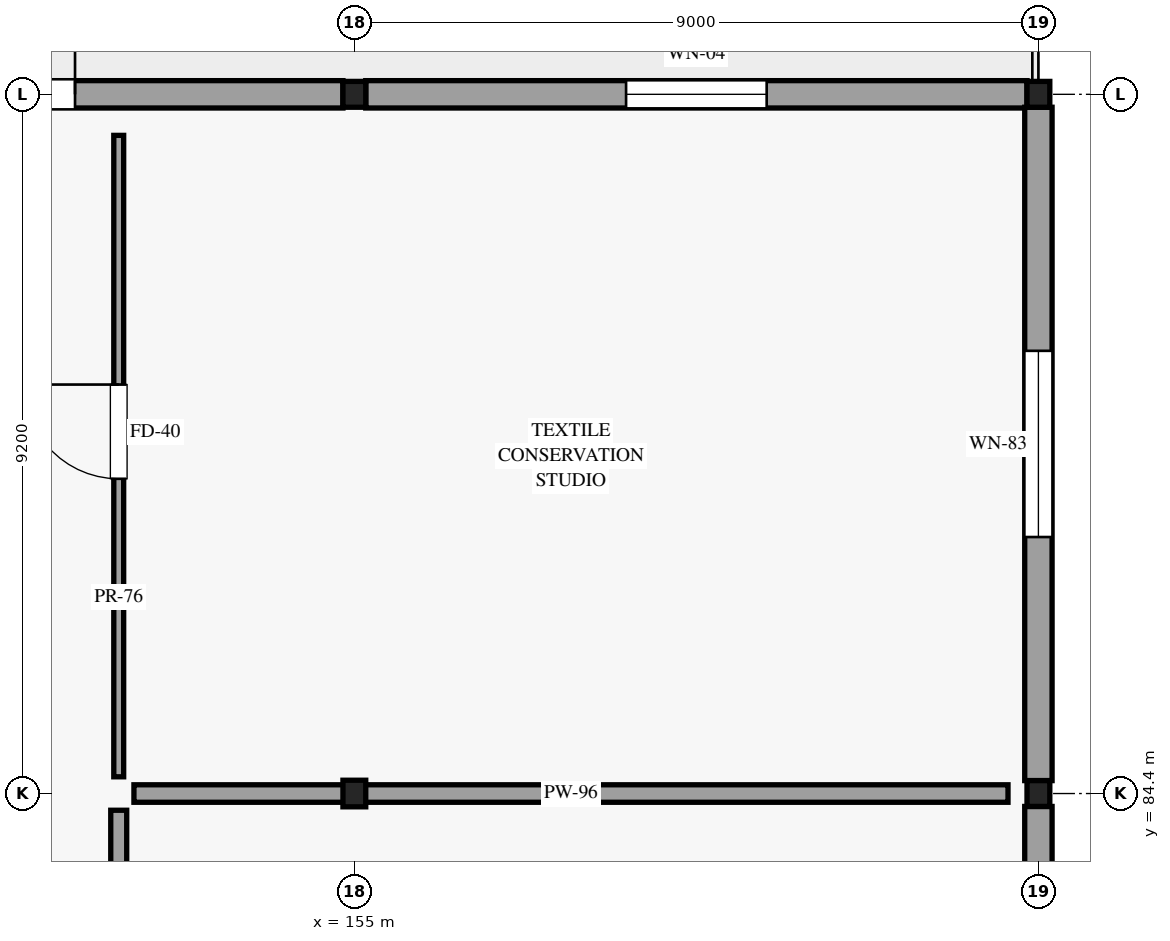
"""IFC4 building model, lengths in metres.
Left out: names, types, materials, properties, quantities, classifications, styles, units other than length and angle.
Written with IfcOpenShell. Run it as: python <this file> out.ifc"""

import sys

from ifc_helpers import new_model, si_unit, direction, frame, frame_2d, origin, origin_2d, place, context, subcontext, project, spatial, rectangle, i_section, extrude, element, fill, save


model = new_model("IFC4")
c1 = context("Model", 3, precision=1e-05, world=origin(), true_north=direction((0.0, 1.0)))
c2 = subcontext(c1, "Body", "Model", "MODEL_VIEW")
j1 = project(units=[si_unit("LENGTHUNIT", "METRE"), si_unit("PLANEANGLEUNIT", "RADIAN")], contexts=[c1])
p1 = place(None, origin())
s1 = spatial("IfcSite", under=j1, at=p1, CompositionType="ELEMENT")
p2 = place(p1, origin())
s2 = spatial("IfcBuilding", under=s1, at=p2, CompositionType="ELEMENT")
p3 = place(p2, frame((0.0, 0.0, 19.5)))
s3 = spatial("IfcBuildingStorey", under=s2, at=p3, CompositionType="ELEMENT", Elevation=19.5)
p4 = place(p3, frame((155.0, 84.4, 0.0), z_axis=(0.0, 0.0, 1.0), x_axis=(1.0, 0.0, 0.0)))
e1 = element("IfcColumn", 1, at=p4, inside=s3, PredefinedType="COLUMN", context=c2, shape_type="SweptSolid", body=[
    extrude(i_section(OverallWidth=0.3, OverallDepth=0.35, WebThickness=0.01, FlangeThickness=0.018, FilletRadius=0.027, at=origin_2d()), origin(), (0.0, 0.0, 1.0), 4.5),
])
for number, where, z_axis, x_axis in (
    (2, (155.0, 93.6, 0.0), (0.0, 0.0, 1.0), (1.0, 0.0, 0.0)),
    (3, (164.0, 84.4, 0.0), (0.0, 0.0, 1.0), (1.0, 0.0, 0.0)),
    (4, (164.0, 93.6, 0.0), (0.0, 0.0, 1.0), (1.0, 0.0, 0.0)),
):
    element("IfcColumn", number, at=place(p3, frame(where, z_axis=z_axis, x_axis=x_axis)), inside=s3, PredefinedType="COLUMN", context=c2, shape_type="SweptSolid", body=[
        extrude(i_section(OverallWidth=0.3, OverallDepth=0.34, WebThickness=0.012, FlangeThickness=0.021, FilletRadius=0.027, at=origin_2d()), origin(), (0.0, 0.0, 1.0), 4.5),
    ])
p5 = place(p3, frame((146.15, 93.6, 0.0), z_axis=(0.0, 0.0, 1.0), x_axis=(1.0, 0.0, 0.0)))
e5 = element("IfcWall", 5, at=p5, inside=s3, PredefinedType="STANDARD", context=c2, shape_type="SweptSolid", body=[
    extrude(rectangle(XDim=8.7, YDim=0.36, at=frame_2d((4.35, 0.0))), origin(), (0.0, 0.0, 1.0), 3.825),
])
p6 = place(p5, frame((3.525, 0.0, 0.0)))
e6 = element("IfcOpeningElement", 6, at=p6, cuts=e5, PredefinedType="OPENING", context=c2, shape_type="SweptSolid", body=[
    extrude(rectangle(XDim=1.65, YDim=2.35, at=frame_2d((0.825, 1.175))), frame((0.0, 0.19, 0.0), z_axis=(0.0, -1.0, 0.0), x_axis=(1.0, 0.0, 0.0)), (0.0, 0.0, 1.0), 0.38),
])
p7 = place(p3, frame((155.15, 93.6, 0.0), z_axis=(0.0, 0.0, 1.0), x_axis=(1.0, 0.0, 0.0)))
e7 = element("IfcWall", 7, at=p7, inside=s3, PredefinedType="STANDARD", context=c2, shape_type="SweptSolid", body=[
    extrude(rectangle(XDim=8.7, YDim=0.36, at=frame_2d((4.35, 0.0))), origin(), (0.0, 0.0, 1.0), 3.825),
])
p8 = place(p7, frame((3.425, 0.0, 0.85)))
e8 = element("IfcOpeningElement", 8, at=p8, cuts=e7, PredefinedType="OPENING", context=c2, shape_type="SweptSolid", body=[
    extrude(rectangle(XDim=1.85, YDim=2.1, at=frame_2d((0.925, 1.05))), frame((0.0, 0.19, 0.0), z_axis=(0.0, -1.0, 0.0), x_axis=(1.0, 0.0, 0.0)), (0.0, 0.0, 1.0), 0.38),
])
p9 = place(p3, frame((164.0, 75.37, 0.0), z_axis=(0.0, 0.0, 1.0), x_axis=(0.0, 1.0, 0.0)))
e9 = element("IfcWall", 9, at=p9, inside=s3, PredefinedType="STANDARD", context=c2, shape_type="SweptSolid", body=[
    extrude(rectangle(XDim=8.86, YDim=0.36, at=frame_2d((4.43, 0.0))), origin(), (0.0, 0.0, 1.0), 3.825),
])
p10 = place(p9, frame((5.555, 0.0, 0.85), z_axis=(0.0, 0.0, 1.0), x_axis=(-1.0, 0.0, 0.0)))
e10 = element("IfcOpeningElement", 10, at=p10, cuts=e9, PredefinedType="OPENING", context=c2, shape_type="SweptSolid", body=[
    extrude(rectangle(XDim=2.25, YDim=2.3, at=frame_2d((1.125, 1.15))), frame((0.0, 0.19, 0.0), z_axis=(0.0, -1.0, 0.0), x_axis=(1.0, 0.0, 0.0)), (0.0, 0.0, 1.0), 0.38),
])
p11 = place(p3, frame((164.0, 84.57, 0.0), z_axis=(0.0, 0.0, 1.0), x_axis=(0.0, 1.0, 0.0)))
e11 = element("IfcWall", 11, at=p11, inside=s3, PredefinedType="STANDARD", context=c2, shape_type="SweptSolid", body=[
    extrude(rectangle(XDim=8.86, YDim=0.36, at=frame_2d((4.43, 0.0))), origin(), (0.0, 0.0, 1.0), 3.825),
])
p12 = place(p11, frame((5.655, 0.0, 0.85), z_axis=(0.0, 0.0, 1.0), x_axis=(-1.0, 0.0, 0.0)))
e12 = element("IfcOpeningElement", 12, at=p12, cuts=e11, PredefinedType="OPENING", context=c2, shape_type="SweptSolid", body=[
    extrude(rectangle(XDim=2.45, YDim=2.4, at=frame_2d((1.225, 1.2))), frame((0.0, 0.19, 0.0), z_axis=(0.0, -1.0, 0.0), x_axis=(1.0, 0.0, 0.0)), (0.0, 0.0, 1.0), 0.38),
])
p13 = place(p3, frame((151.9, 75.42, 0.0), z_axis=(0.0, 0.0, 1.0), x_axis=(0.0, 1.0, 0.0)))
e13 = element("IfcWall", 13, at=p13, inside=s3, PredefinedType="PARTITIONING", context=c2, shape_type="SweptSolid", body=[
    extrude(rectangle(XDim=8.76, YDim=0.21, at=frame_2d((4.38, 0.0))), origin(), (0.0, 0.0, 1.0), 3.825),
])
p14 = place(p13, frame((3.88, 0.0, 0.0)))
e14 = element("IfcOpeningElement", 14, at=p14, cuts=e13, PredefinedType="OPENING", context=c2, shape_type="SweptSolid", body=[
    extrude(rectangle(XDim=1.16, YDim=2.28, at=frame_2d((0.58, 1.14))), frame((0.0, 0.115, 0.0), z_axis=(0.0, -1.0, 0.0), x_axis=(1.0, 0.0, 0.0)), (0.0, 0.0, 1.0), 0.23),
])
p15 = place(p3, frame((152.1, 84.4, 0.0), z_axis=(0.0, 0.0, 1.0), x_axis=(1.0, 0.0, 0.0)))
e15 = element("IfcWall", 15, at=p15, inside=s3, PredefinedType="PARTITIONING", context=c2, shape_type="SweptSolid", body=[
    extrude(rectangle(XDim=11.5, YDim=0.23, at=frame_2d((5.75, 0.0))), origin(), (0.0, 0.0, 1.0), 3.825),
])
p16 = place(p3, frame((151.9, 84.62, 0.0), z_axis=(0.0, 0.0, 1.0), x_axis=(0.0, 1.0, 0.0)))
e16 = element("IfcWall", 16, at=p16, inside=s3, PredefinedType="PARTITIONING", context=c2, shape_type="SweptSolid", body=[
    extrude(rectangle(XDim=8.44, YDim=0.13, at=frame_2d((4.22, 0.0))), origin(), (0.0, 0.0, 1.0), 3.825),
])
p17 = place(p16, frame((3.921, 0.0, 0.0)))
e17 = element("IfcOpeningElement", 17, at=p17, cuts=e16, PredefinedType="OPENING", context=c2, shape_type="SweptSolid", body=[
    extrude(rectangle(XDim=1.24, YDim=2.32, at=frame_2d((0.62, 1.16))), frame((0.0, 0.075, 0.0), z_axis=(0.0, -1.0, 0.0), x_axis=(1.0, 0.0, 0.0)), (0.0, 0.0, 1.0), 0.15),
])
p18 = place(p6, origin())
e18 = element("IfcDoor", 18, at=p18, inside=s3, OperationType="DOUBLE_DOOR_SINGLE_SWING", PredefinedType="DOOR", context=c2, shape_type="SweptSolid", body=[
    extrude(rectangle(XDim=1.65, YDim=2.35, at=frame_2d((0.825, 1.175))), frame((0.0, 0.025, 0.0), z_axis=(0.0, -1.0, 0.0), x_axis=(1.0, 0.0, 0.0)), (0.0, 0.0, 1.0), 0.05),
])
fill(e6, e18)
p19 = place(p8, origin())
e19 = element("IfcWindow", 19, at=p19, inside=s3, PartitioningType="SINGLE_PANEL", PredefinedType="WINDOW", context=c2, shape_type="SweptSolid", body=[
    extrude(rectangle(XDim=1.85, YDim=2.1, at=frame_2d((0.925, 1.05))), frame((0.0, 0.03, 0.0), z_axis=(0.0, -1.0, 0.0), x_axis=(1.0, 0.0, 0.0)), (0.0, 0.0, 1.0), 0.06),
])
fill(e8, e19)
p20 = place(p12, origin())
e20 = element("IfcWindow", 20, at=p20, inside=s3, PartitioningType="SINGLE_PANEL", PredefinedType="WINDOW", context=c2, shape_type="SweptSolid", body=[
    extrude(rectangle(XDim=2.45, YDim=2.4, at=frame_2d((1.225, 1.2))), frame((0.0, 0.03, 0.0), z_axis=(0.0, -1.0, 0.0), x_axis=(1.0, 0.0, 0.0)), (0.0, 0.0, 1.0), 0.06),
])
fill(e12, e20)
p21 = place(p17, origin())
e21 = element("IfcDoor", 21, at=p21, inside=s3, OperationType="SINGLE_SWING_RIGHT", PredefinedType="DOOR", context=c2, shape_type="SweptSolid", body=[
    extrude(rectangle(XDim=1.24, YDim=2.32, at=frame_2d((0.62, 1.16))), frame((0.0, 0.025, 0.0), z_axis=(0.0, -1.0, 0.0), x_axis=(1.0, 0.0, 0.0)), (0.0, 0.0, 1.0), 0.05),
])
fill(e17, e21)
save(model, sys.argv[1])
